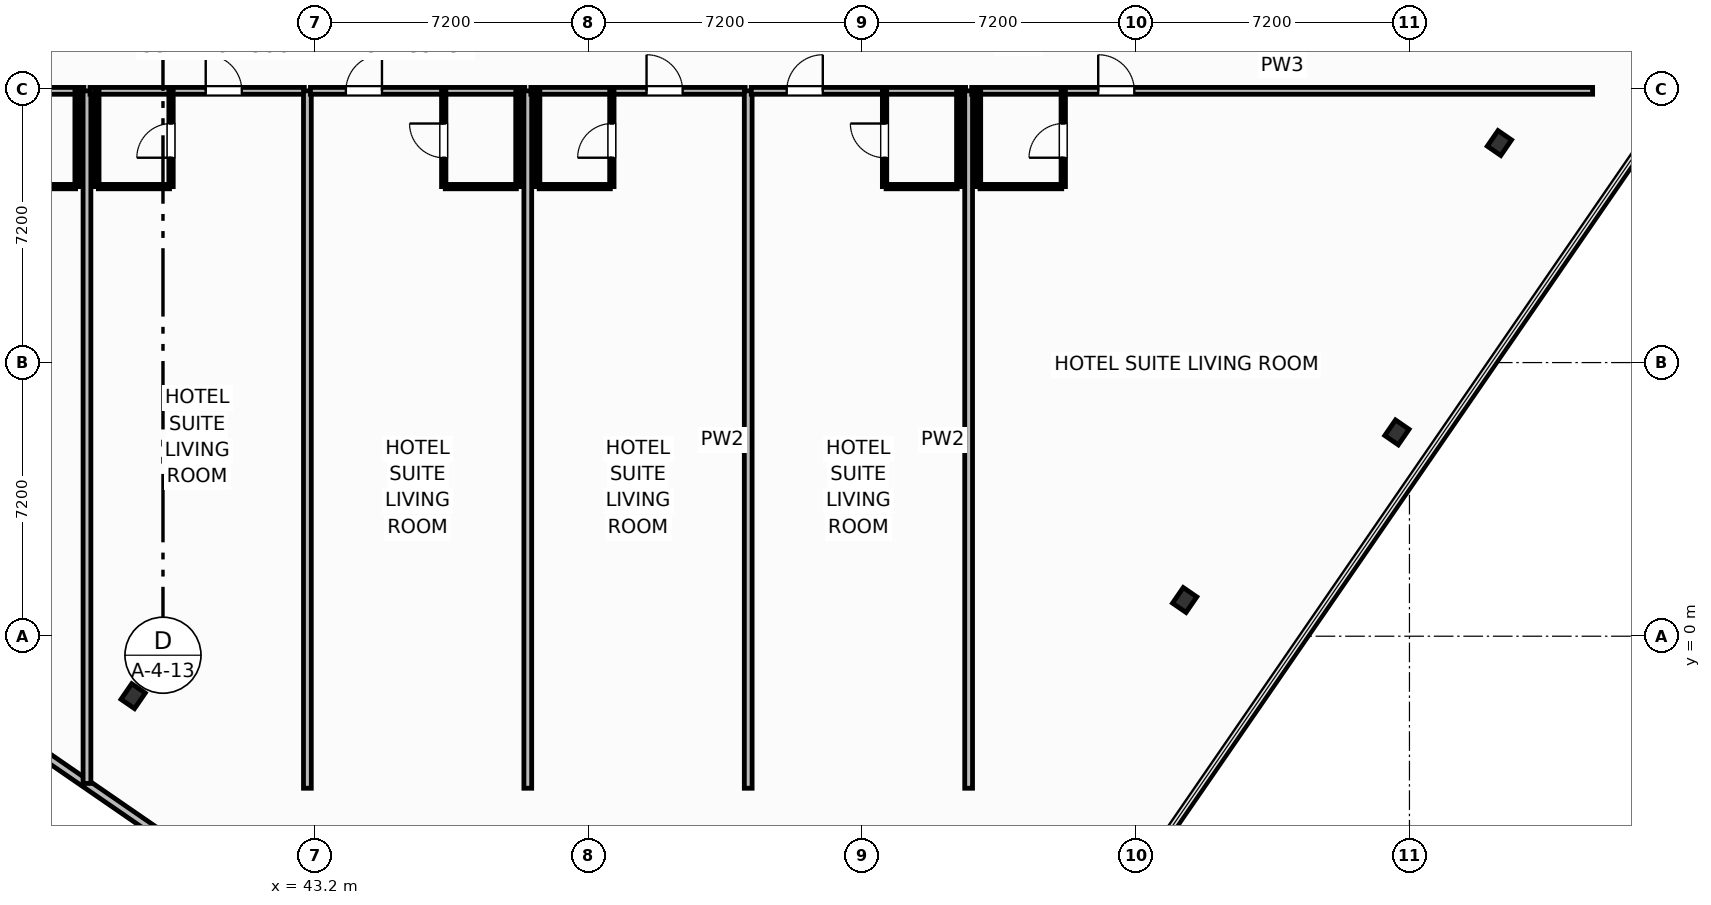
"""IFC4 building model, lengths in metres.
Left out: names, types, materials, properties, quantities, classifications, styles, units other than length and angle.
Written with IfcOpenShell. Run it as: python <this file> out.ifc"""

import sys

from ifc_helpers import new_model, si_unit, direction, frame, frame_2d, origin, origin_2d, place, context, subcontext, project, spatial, rectangle, i_section, extrude, element, fill, save


model = new_model("IFC4")
c1 = context("Model", 3, precision=1e-05, world=origin(), true_north=direction((0.0, 1.0)))
c2 = subcontext(c1, "Body", "Model", "MODEL_VIEW")
j1 = project(units=[si_unit("LENGTHUNIT", "METRE"), si_unit("PLANEANGLEUNIT", "RADIAN")], contexts=[c1])
p1 = place(None, origin())
s1 = spatial("IfcSite", under=j1, at=p1, CompositionType="ELEMENT")
p2 = place(p1, origin())
s2 = spatial("IfcBuilding", under=s1, at=p2, CompositionType="ELEMENT")
p3 = place(p2, frame((0.0, 0.0, 60.3)))
s3 = spatial("IfcBuildingStorey", under=s2, at=p3, CompositionType="ELEMENT", Elevation=60.3)
for number, where, z_axis, x_axis in (
    (1, (38.415, -1.577, 0.0), (0.0, 0.0, 1.0), (0.824, -0.567, 0.0)),
    (2, (66.085, 0.953, 0.0), (0.0, 0.0, 1.0), (0.824, -0.567, 0.0)),
    (3, (71.67, 5.363, 0.0), (0.0, 0.0, 1.0), (0.824, -0.567, 0.0)),
    (4, (74.367, 12.976, 0.0), (0.0, 0.0, 1.0), (0.824, -0.567, 0.0)),
):
    element("IfcColumn", number, at=place(p3, frame(where, z_axis=z_axis, x_axis=x_axis)), inside=s3, PredefinedType="COLUMN", context=c2, shape_type="SweptSolid", body=[
        extrude(i_section(OverallWidth=0.432, OverallDepth=0.498, WebThickness=0.056, FlangeThickness=0.089, FilletRadius=0.025, at=origin_2d()), origin(), (0.0, 0.0, 1.0), 3.7),
    ])
p4 = place(p3, frame((33.518, -1.362, 0.0), z_axis=(0.0, 0.0, 1.0), x_axis=(0.82353935489, -0.567259139148, 0.0)))
e5 = element("IfcWall", 5, at=p4, inside=s3, PredefinedType="SOLIDWALL", context=c2, shape_type="SweptSolid", body=[
    extrude(rectangle(XDim=23.147, YDim=0.22, at=frame_2d((11.573, 0.0))), origin(), (0.0, 0.0, 1.0), 2.73),
])
p5 = place(p4, frame((10.749, 0.0, 0.8)))
e6 = element("IfcOpeningElement", 6, at=p5, cuts=e5, PredefinedType="OPENING", context=c2, shape_type="SweptSolid", body=[
    extrude(rectangle(XDim=1.65, YDim=1.65, at=frame_2d((0.825, 0.825))), frame((0.0, 0.12, 0.0), z_axis=(0.0, -1.0, 0.0), x_axis=(1.0, 0.0, 0.0)), (0.0, 0.0, 1.0), 0.24),
])
p6 = place(p3, frame((31.48, 14.35, 0.0), z_axis=(0.0, 0.0, 1.0), x_axis=(1.0, 0.0, 0.0)))
e7 = element("IfcWall", 7, at=p6, inside=s3, PredefinedType="PARTITIONING", context=c2, shape_type="SweptSolid", body=[
    extrude(rectangle(XDim=5.64, YDim=0.18, at=frame_2d((2.82, 0.0))), origin(), (0.0, 0.0, 1.0), 3.45),
])
p7 = place(p6, frame((0.933, 0.0, 0.0)))
e8 = element("IfcOpeningElement", 8, at=p7, cuts=e7, PredefinedType="OPENING", context=c2, shape_type="SweptSolid", body=[
    extrude(rectangle(XDim=0.95, YDim=2.15, at=frame_2d((0.475, 1.075))), frame((0.0, 0.1, 0.0), z_axis=(0.0, -1.0, 0.0), x_axis=(1.0, 0.0, 0.0)), (0.0, 0.0, 1.0), 0.2),
])
p8 = place(p3, frame((35.028, 11.83, 0.0), z_axis=(0.0, 0.0, 1.0), x_axis=(1.0, 0.0, 0.0)))
e9 = element("IfcWall", 9, at=p8, inside=s3, PredefinedType="PARTITIONING", context=c2, shape_type="SweptSolid", body=[
    extrude(rectangle(XDim=1.872, YDim=0.115, at=frame_2d((0.936, 0.0))), origin(), (0.0, 0.0, 1.0), 3.45),
])
p9 = place(p3, frame((36.94, 11.83, 0.0), z_axis=(0.0, 0.0, 1.0), x_axis=(0.0, 1.0, 0.0)))
e10 = element("IfcWall", 10, at=p9, inside=s3, PredefinedType="PARTITIONING", context=c2, shape_type="SweptSolid", body=[
    extrude(rectangle(XDim=2.52, YDim=0.115, at=frame_2d((1.26, 0.0))), origin(), (0.0, 0.0, 1.0), 3.45),
])
p10 = place(p3, frame((37.2, -3.874, 0.0), z_axis=(0.0, 0.0, 1.0), x_axis=(0.0, 1.0, 0.0)))
e11 = element("IfcWall", 11, at=p10, inside=s3, PredefinedType="PARTITIONING", context=c2, shape_type="SweptSolid", body=[
    extrude(rectangle(XDim=18.224, YDim=0.205, at=frame_2d((9.112, 0.0))), origin(), (0.0, 0.0, 1.0), 3.45),
])
p11 = place(p3, frame((37.28, 14.35, 0.0), z_axis=(0.0, 0.0, 1.0), x_axis=(1.0, 0.0, 0.0)))
e12 = element("IfcWall", 12, at=p11, inside=s3, PredefinedType="PARTITIONING", context=c2, shape_type="SweptSolid", body=[
    extrude(rectangle(XDim=5.64, YDim=0.18, at=frame_2d((2.82, 0.0))), origin(), (0.0, 0.0, 1.0), 3.45),
])
p12 = place(p11, frame((3.045, 0.0, 0.0)))
e13 = element("IfcOpeningElement", 13, at=p12, cuts=e12, PredefinedType="OPENING", context=c2, shape_type="SweptSolid", body=[
    extrude(rectangle(XDim=0.95, YDim=2.15, at=frame_2d((0.475, 1.075))), frame((0.0, 0.1, 0.0), z_axis=(0.0, -1.0, 0.0), x_axis=(1.0, 0.0, 0.0)), (0.0, 0.0, 1.0), 0.2),
])
p13 = place(p3, frame((37.5, 11.83, 0.0), z_axis=(0.0, 0.0, 1.0), x_axis=(1.0, 0.0, 0.0)))
e14 = element("IfcWall", 14, at=p13, inside=s3, PredefinedType="PARTITIONING", context=c2, shape_type="SweptSolid", body=[
    extrude(rectangle(XDim=1.872, YDim=0.115, at=frame_2d((0.936, 0.0))), origin(), (0.0, 0.0, 1.0), 3.45),
])
p14 = place(p3, frame((39.412, 11.83, 0.0), z_axis=(0.0, 0.0, 1.0), x_axis=(0.0, 1.0, 0.0)))
e15 = element("IfcWall", 15, at=p14, inside=s3, PredefinedType="PARTITIONING", context=c2, shape_type="SweptSolid", body=[
    extrude(rectangle(XDim=2.52, YDim=0.115, at=frame_2d((1.26, 0.0))), origin(), (0.0, 0.0, 1.0), 3.45),
])
p15 = place(p14, frame((0.76, 0.0, 0.0)))
e16 = element("IfcOpeningElement", 16, at=p15, cuts=e15, PredefinedType="OPENING", context=c2, shape_type="SweptSolid", body=[
    extrude(rectangle(XDim=0.9, YDim=2.05, at=frame_2d((0.45, 1.025))), frame((0.0, 0.067, 0.0), z_axis=(0.0, -1.0, 0.0), x_axis=(1.0, 0.0, 0.0)), (0.0, 0.0, 1.0), 0.135),
])
p16 = place(p3, frame((37.46, 11.83, 0.0), z_axis=(0.0, 0.0, 1.0), x_axis=(0.0, 1.0, 0.0)))
e17 = element("IfcWall", 17, at=p16, inside=s3, PredefinedType="PARTITIONING", context=c2, shape_type="SweptSolid", body=[
    extrude(rectangle(XDim=2.52, YDim=0.115, at=frame_2d((1.26, 0.0))), origin(), (0.0, 0.0, 1.0), 3.45),
])
p17 = place(p3, frame((43.0, -4.0, 0.0), z_axis=(0.0, 0.0, 1.0), x_axis=(0.0, 1.0, 0.0)))
e18 = element("IfcWall", 18, at=p17, inside=s3, PredefinedType="PARTITIONING", context=c2, shape_type="SweptSolid", body=[
    extrude(rectangle(XDim=18.35, YDim=0.205, at=frame_2d((9.175, 0.0))), origin(), (0.0, 0.0, 1.0), 2.58),
])
p18 = place(p3, frame((43.08, 14.35, 0.0), z_axis=(0.0, 0.0, 1.0), x_axis=(1.0, 0.0, 0.0)))
e19 = element("IfcWall", 19, at=p18, inside=s3, PredefinedType="PARTITIONING", context=c2, shape_type="SweptSolid", body=[
    extrude(rectangle(XDim=5.64, YDim=0.18, at=frame_2d((2.82, 0.0))), origin(), (0.0, 0.0, 1.0), 3.45),
])
p19 = place(p18, frame((0.933, 0.0, 0.0)))
e20 = element("IfcOpeningElement", 20, at=p19, cuts=e19, PredefinedType="OPENING", context=c2, shape_type="SweptSolid", body=[
    extrude(rectangle(XDim=0.95, YDim=2.15, at=frame_2d((0.475, 1.075))), frame((0.0, 0.1, 0.0), z_axis=(0.0, -1.0, 0.0), x_axis=(1.0, 0.0, 0.0)), (0.0, 0.0, 1.0), 0.2),
])
p20 = place(p3, frame((46.628, 11.83, 0.0), z_axis=(0.0, 0.0, 1.0), x_axis=(1.0, 0.0, 0.0)))
e21 = element("IfcWall", 21, at=p20, inside=s3, PredefinedType="PARTITIONING", context=c2, shape_type="SweptSolid", body=[
    extrude(rectangle(XDim=1.872, YDim=0.115, at=frame_2d((0.936, 0.0))), origin(), (0.0, 0.0, 1.0), 3.45),
])
p21 = place(p3, frame((46.588, 11.83, 0.0), z_axis=(0.0, 0.0, 1.0), x_axis=(0.0, 1.0, 0.0)))
e22 = element("IfcWall", 22, at=p21, inside=s3, PredefinedType="PARTITIONING", context=c2, shape_type="SweptSolid", body=[
    extrude(rectangle(XDim=2.52, YDim=0.115, at=frame_2d((1.26, 0.0))), origin(), (0.0, 0.0, 1.0), 3.45),
])
p22 = place(p21, frame((0.76, 0.0, 0.0)))
e23 = element("IfcOpeningElement", 23, at=p22, cuts=e22, PredefinedType="OPENING", context=c2, shape_type="SweptSolid", body=[
    extrude(rectangle(XDim=0.9, YDim=2.05, at=frame_2d((0.45, 1.025))), frame((0.0, 0.067, 0.0), z_axis=(0.0, -1.0, 0.0), x_axis=(1.0, 0.0, 0.0)), (0.0, 0.0, 1.0), 0.135),
])
p23 = place(p3, frame((48.54, 11.83, 0.0), z_axis=(0.0, 0.0, 1.0), x_axis=(0.0, 1.0, 0.0)))
e24 = element("IfcWall", 24, at=p23, inside=s3, PredefinedType="PARTITIONING", context=c2, shape_type="SweptSolid", body=[
    extrude(rectangle(XDim=2.52, YDim=0.115, at=frame_2d((1.26, 0.0))), origin(), (0.0, 0.0, 1.0), 3.45),
])
p24 = place(p3, frame((48.8, -4.0, 0.0), z_axis=(0.0, 0.0, 1.0), x_axis=(0.0, 1.0, 0.0)))
e25 = element("IfcWall", 25, at=p24, inside=s3, PredefinedType="PARTITIONING", context=c2, shape_type="SweptSolid", body=[
    extrude(rectangle(XDim=18.35, YDim=0.205, at=frame_2d((9.175, 0.0))), origin(), (0.0, 0.0, 1.0), 3.45),
])
p25 = place(p3, frame((48.88, 14.35, 0.0), z_axis=(0.0, 0.0, 1.0), x_axis=(1.0, 0.0, 0.0)))
e26 = element("IfcWall", 26, at=p25, inside=s3, PredefinedType="PARTITIONING", context=c2, shape_type="SweptSolid", body=[
    extrude(rectangle(XDim=5.64, YDim=0.18, at=frame_2d((2.82, 0.0))), origin(), (0.0, 0.0, 1.0), 3.45),
])
p26 = place(p25, frame((3.045, 0.0, 0.0)))
e27 = element("IfcOpeningElement", 27, at=p26, cuts=e26, PredefinedType="OPENING", context=c2, shape_type="SweptSolid", body=[
    extrude(rectangle(XDim=0.95, YDim=2.15, at=frame_2d((0.475, 1.075))), frame((0.0, 0.1, 0.0), z_axis=(0.0, -1.0, 0.0), x_axis=(1.0, 0.0, 0.0)), (0.0, 0.0, 1.0), 0.2),
])
p27 = place(p3, frame((49.1, 11.83, 0.0), z_axis=(0.0, 0.0, 1.0), x_axis=(1.0, 0.0, 0.0)))
e28 = element("IfcWall", 28, at=p27, inside=s3, PredefinedType="PARTITIONING", context=c2, shape_type="SweptSolid", body=[
    extrude(rectangle(XDim=1.872, YDim=0.115, at=frame_2d((0.936, 0.0))), origin(), (0.0, 0.0, 1.0), 3.45),
])
p28 = place(p3, frame((51.012, 11.83, 0.0), z_axis=(0.0, 0.0, 1.0), x_axis=(0.0, 1.0, 0.0)))
e29 = element("IfcWall", 29, at=p28, inside=s3, PredefinedType="PARTITIONING", context=c2, shape_type="SweptSolid", body=[
    extrude(rectangle(XDim=2.52, YDim=0.115, at=frame_2d((1.26, 0.0))), origin(), (0.0, 0.0, 1.0), 3.45),
])
p29 = place(p28, frame((0.76, 0.0, 0.0)))
e30 = element("IfcOpeningElement", 30, at=p29, cuts=e29, PredefinedType="OPENING", context=c2, shape_type="SweptSolid", body=[
    extrude(rectangle(XDim=0.9, YDim=2.05, at=frame_2d((0.45, 1.025))), frame((0.0, 0.067, 0.0), z_axis=(0.0, -1.0, 0.0), x_axis=(1.0, 0.0, 0.0)), (0.0, 0.0, 1.0), 0.135),
])
p30 = place(p3, frame((49.06, 11.83, 0.0), z_axis=(0.0, 0.0, 1.0), x_axis=(0.0, 1.0, 0.0)))
e31 = element("IfcWall", 31, at=p30, inside=s3, PredefinedType="PARTITIONING", context=c2, shape_type="SweptSolid", body=[
    extrude(rectangle(XDim=2.52, YDim=0.115, at=frame_2d((1.26, 0.0))), origin(), (0.0, 0.0, 1.0), 3.45),
])
p31 = place(p3, frame((54.6, -4.0, 0.0), z_axis=(0.0, 0.0, 1.0), x_axis=(0.0, 1.0, 0.0)))
e32 = element("IfcWall", 32, at=p31, inside=s3, PredefinedType="PARTITIONING", context=c2, shape_type="SweptSolid", body=[
    extrude(rectangle(XDim=18.35, YDim=0.205, at=frame_2d((9.175, 0.0))), origin(), (0.0, 0.0, 1.0), 3.45),
])
p32 = place(p3, frame((54.68, 14.35, 0.0), z_axis=(0.0, 0.0, 1.0), x_axis=(1.0, 0.0, 0.0)))
e33 = element("IfcWall", 33, at=p32, inside=s3, PredefinedType="PARTITIONING", context=c2, shape_type="SweptSolid", body=[
    extrude(rectangle(XDim=5.64, YDim=0.18, at=frame_2d((2.82, 0.0))), origin(), (0.0, 0.0, 1.0), 3.45),
])
p33 = place(p32, frame((0.933, 0.0, 0.0)))
e34 = element("IfcOpeningElement", 34, at=p33, cuts=e33, PredefinedType="OPENING", context=c2, shape_type="SweptSolid", body=[
    extrude(rectangle(XDim=0.95, YDim=2.15, at=frame_2d((0.475, 1.075))), frame((0.0, 0.1, 0.0), z_axis=(0.0, -1.0, 0.0), x_axis=(1.0, 0.0, 0.0)), (0.0, 0.0, 1.0), 0.2),
])
p34 = place(p3, frame((58.228, 11.83, 0.0), z_axis=(0.0, 0.0, 1.0), x_axis=(1.0, 0.0, 0.0)))
e35 = element("IfcWall", 35, at=p34, inside=s3, PredefinedType="PARTITIONING", context=c2, shape_type="SweptSolid", body=[
    extrude(rectangle(XDim=1.872, YDim=0.115, at=frame_2d((0.936, 0.0))), origin(), (0.0, 0.0, 1.0), 3.45),
])
p35 = place(p3, frame((58.188, 11.83, 0.0), z_axis=(0.0, 0.0, 1.0), x_axis=(0.0, 1.0, 0.0)))
e36 = element("IfcWall", 36, at=p35, inside=s3, PredefinedType="PARTITIONING", context=c2, shape_type="SweptSolid", body=[
    extrude(rectangle(XDim=2.52, YDim=0.115, at=frame_2d((1.26, 0.0))), origin(), (0.0, 0.0, 1.0), 3.45),
])
p36 = place(p35, frame((0.76, 0.0, 0.0)))
e37 = element("IfcOpeningElement", 37, at=p36, cuts=e36, PredefinedType="OPENING", context=c2, shape_type="SweptSolid", body=[
    extrude(rectangle(XDim=0.9, YDim=2.05, at=frame_2d((0.45, 1.025))), frame((0.0, 0.067, 0.0), z_axis=(0.0, -1.0, 0.0), x_axis=(1.0, 0.0, 0.0)), (0.0, 0.0, 1.0), 0.135),
])
p37 = place(p3, frame((60.14, 11.83, 0.0), z_axis=(0.0, 0.0, 1.0), x_axis=(0.0, 1.0, 0.0)))
e38 = element("IfcWall", 38, at=p37, inside=s3, PredefinedType="PARTITIONING", context=c2, shape_type="SweptSolid", body=[
    extrude(rectangle(XDim=2.52, YDim=0.115, at=frame_2d((1.26, 0.0))), origin(), (0.0, 0.0, 1.0), 3.45),
])
p38 = place(p3, frame((60.4, -4.0, 0.0), z_axis=(0.0, 0.0, 1.0), x_axis=(0.0, 1.0, 0.0)))
e39 = element("IfcWall", 39, at=p38, inside=s3, PredefinedType="PARTITIONING", context=c2, shape_type="SweptSolid", body=[
    extrude(rectangle(XDim=18.35, YDim=0.205, at=frame_2d((9.175, 0.0))), origin(), (0.0, 0.0, 1.0), 3.45),
])
p39 = place(p3, frame((60.48, 14.35, 0.0), z_axis=(0.0, 0.0, 1.0), x_axis=(1.0, 0.0, 0.0)))
e40 = element("IfcWall", 40, at=p39, inside=s3, PredefinedType="PARTITIONING", context=c2, shape_type="SweptSolid", body=[
    extrude(rectangle(XDim=16.34, YDim=0.18, at=frame_2d((8.17, 0.0))), origin(), (0.0, 0.0, 1.0), 2.58),
])
p40 = place(p39, frame((3.33, 0.0, 0.0)))
e41 = element("IfcOpeningElement", 41, at=p40, cuts=e40, PredefinedType="OPENING", context=c2, shape_type="SweptSolid", body=[
    extrude(rectangle(XDim=0.95, YDim=2.15, at=frame_2d((0.475, 1.075))), frame((0.0, 0.1, 0.0), z_axis=(0.0, -1.0, 0.0), x_axis=(1.0, 0.0, 0.0)), (0.0, 0.0, 1.0), 0.2),
])
p41 = place(p3, frame((60.7, 11.83, 0.0), z_axis=(0.0, 0.0, 1.0), x_axis=(1.0, 0.0, 0.0)))
e42 = element("IfcWall", 42, at=p41, inside=s3, PredefinedType="PARTITIONING", context=c2, shape_type="SweptSolid", body=[
    extrude(rectangle(XDim=2.15, YDim=0.115, at=frame_2d((1.075, 0.0))), origin(), (0.0, 0.0, 1.0), 3.45),
])
p42 = place(p3, frame((62.89, 11.83, 0.0), z_axis=(0.0, 0.0, 1.0), x_axis=(0.0, 1.0, 0.0)))
e43 = element("IfcWall", 43, at=p42, inside=s3, PredefinedType="PARTITIONING", context=c2, shape_type="SweptSolid", body=[
    extrude(rectangle(XDim=2.52, YDim=0.115, at=frame_2d((1.26, 0.0))), origin(), (0.0, 0.0, 1.0), 3.45),
])
p43 = place(p42, frame((0.76, 0.0, 0.0)))
e44 = element("IfcOpeningElement", 44, at=p43, cuts=e43, PredefinedType="OPENING", context=c2, shape_type="SweptSolid", body=[
    extrude(rectangle(XDim=0.9, YDim=2.05, at=frame_2d((0.45, 1.025))), frame((0.0, 0.067, 0.0), z_axis=(0.0, -1.0, 0.0), x_axis=(1.0, 0.0, 0.0)), (0.0, 0.0, 1.0), 0.135),
])
p44 = place(p3, frame((60.66, 11.83, 0.0), z_axis=(0.0, 0.0, 1.0), x_axis=(0.0, 1.0, 0.0)))
e45 = element("IfcWall", 45, at=p44, inside=s3, PredefinedType="PARTITIONING", context=c2, shape_type="SweptSolid", body=[
    extrude(rectangle(XDim=2.52, YDim=0.115, at=frame_2d((1.26, 0.0))), origin(), (0.0, 0.0, 1.0), 3.45),
])
p45 = place(p12, origin())
e46 = element("IfcDoor", 46, at=p45, inside=s3, OperationType="SINGLE_SWING_LEFT", PredefinedType="DOOR", context=c2, shape_type="SweptSolid", body=[
    extrude(rectangle(XDim=0.95, YDim=2.15, at=frame_2d((0.475, 1.075))), frame((0.0, 0.025, 0.0), z_axis=(0.0, -1.0, 0.0), x_axis=(1.0, 0.0, 0.0)), (0.0, 0.0, 1.0), 0.05),
])
fill(e13, e46)
p46 = place(p15, origin())
e47 = element("IfcDoor", 47, at=p46, inside=s3, OperationType="SINGLE_SWING_LEFT", PredefinedType="DOOR", context=c2, shape_type="SweptSolid", body=[
    extrude(rectangle(XDim=0.9, YDim=2.05, at=frame_2d((0.45, 1.025))), frame((0.0, 0.025, 0.0), z_axis=(0.0, -1.0, 0.0), x_axis=(1.0, 0.0, 0.0)), (0.0, 0.0, 1.0), 0.05),
])
fill(e16, e47)
p47 = place(p19, origin())
e48 = element("IfcDoor", 48, at=p47, inside=s3, OperationType="SINGLE_SWING_RIGHT", PredefinedType="DOOR", context=c2, shape_type="SweptSolid", body=[
    extrude(rectangle(XDim=0.95, YDim=2.15, at=frame_2d((0.475, 1.075))), frame((0.0, 0.025, 0.0), z_axis=(0.0, -1.0, 0.0), x_axis=(1.0, 0.0, 0.0)), (0.0, 0.0, 1.0), 0.05),
])
fill(e20, e48)
p48 = place(p22, origin())
e49 = element("IfcDoor", 49, at=p48, inside=s3, OperationType="SINGLE_SWING_RIGHT", PredefinedType="DOOR", context=c2, shape_type="SweptSolid", body=[
    extrude(rectangle(XDim=0.9, YDim=2.05, at=frame_2d((0.45, 1.025))), frame((0.0, 0.025, 0.0), z_axis=(0.0, -1.0, 0.0), x_axis=(1.0, 0.0, 0.0)), (0.0, 0.0, 1.0), 0.05),
])
fill(e23, e49)
p49 = place(p26, origin())
e50 = element("IfcDoor", 50, at=p49, inside=s3, OperationType="SINGLE_SWING_LEFT", PredefinedType="DOOR", context=c2, shape_type="SweptSolid", body=[
    extrude(rectangle(XDim=0.95, YDim=2.15, at=frame_2d((0.475, 1.075))), frame((0.0, 0.025, 0.0), z_axis=(0.0, -1.0, 0.0), x_axis=(1.0, 0.0, 0.0)), (0.0, 0.0, 1.0), 0.05),
])
fill(e27, e50)
p50 = place(p29, origin())
e51 = element("IfcDoor", 51, at=p50, inside=s3, OperationType="SINGLE_SWING_LEFT", PredefinedType="DOOR", context=c2, shape_type="SweptSolid", body=[
    extrude(rectangle(XDim=0.9, YDim=2.05, at=frame_2d((0.45, 1.025))), frame((0.0, 0.025, 0.0), z_axis=(0.0, -1.0, 0.0), x_axis=(1.0, 0.0, 0.0)), (0.0, 0.0, 1.0), 0.05),
])
fill(e30, e51)
p51 = place(p33, origin())
e52 = element("IfcDoor", 52, at=p51, inside=s3, OperationType="SINGLE_SWING_RIGHT", PredefinedType="DOOR", context=c2, shape_type="SweptSolid", body=[
    extrude(rectangle(XDim=0.95, YDim=2.15, at=frame_2d((0.475, 1.075))), frame((0.0, 0.025, 0.0), z_axis=(0.0, -1.0, 0.0), x_axis=(1.0, 0.0, 0.0)), (0.0, 0.0, 1.0), 0.05),
])
fill(e34, e52)
p52 = place(p36, origin())
e53 = element("IfcDoor", 53, at=p52, inside=s3, OperationType="SINGLE_SWING_RIGHT", PredefinedType="DOOR", context=c2, shape_type="SweptSolid", body=[
    extrude(rectangle(XDim=0.9, YDim=2.05, at=frame_2d((0.45, 1.025))), frame((0.0, 0.025, 0.0), z_axis=(0.0, -1.0, 0.0), x_axis=(1.0, 0.0, 0.0)), (0.0, 0.0, 1.0), 0.05),
])
fill(e37, e53)
p53 = place(p40, origin())
e54 = element("IfcDoor", 54, at=p53, inside=s3, OperationType="SINGLE_SWING_LEFT", PredefinedType="DOOR", context=c2, shape_type="SweptSolid", body=[
    extrude(rectangle(XDim=0.95, YDim=2.15, at=frame_2d((0.475, 1.075))), frame((0.0, 0.025, 0.0), z_axis=(0.0, -1.0, 0.0), x_axis=(1.0, 0.0, 0.0)), (0.0, 0.0, 1.0), 0.05),
])
fill(e41, e54)
p54 = place(p43, origin())
e55 = element("IfcDoor", 55, at=p54, inside=s3, OperationType="SINGLE_SWING_LEFT", PredefinedType="DOOR", context=c2, shape_type="SweptSolid", body=[
    extrude(rectangle(XDim=0.9, YDim=2.05, at=frame_2d((0.45, 1.025))), frame((0.0, 0.025, 0.0), z_axis=(0.0, -1.0, 0.0), x_axis=(1.0, 0.0, 0.0)), (0.0, 0.0, 1.0), 0.05),
])
fill(e44, e55)
save(model, sys.argv[1])
